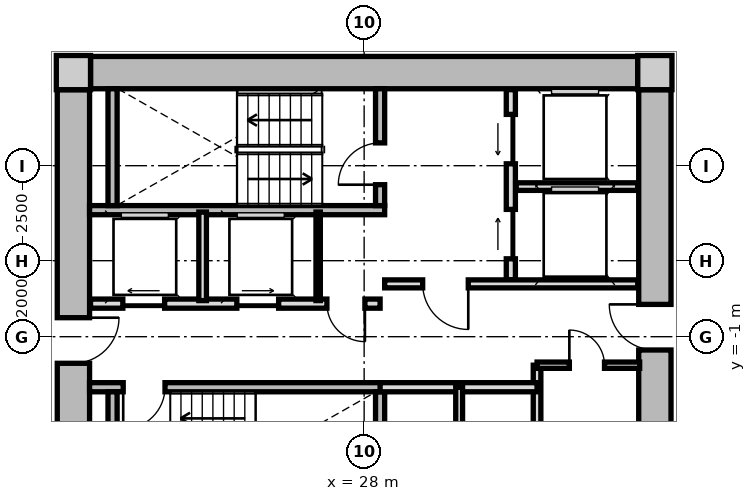
"""IFC4 building model, lengths in metres.
Left out: names, types, materials, properties, quantities, classifications, styles, units other than length and angle.
Written with IfcOpenShell. Run it as: python <this file> out.ifc"""

import sys

from ifc_helpers import new_model, si_unit, direction, frame, frame_2d, origin, origin_2d, place, context, subcontext, project, spatial, rectangle, extrude, source, transform, mapped, element, fill, save


model = new_model("IFC4")
c1 = context("Model", 3, precision=1e-05, world=origin(), true_north=direction((0.0, 1.0)))
c2 = subcontext(c1, "Body", "Model", "MODEL_VIEW")
j1 = project(units=[si_unit("LENGTHUNIT", "METRE"), si_unit("PLANEANGLEUNIT", "RADIAN")], contexts=[c1])
p1 = place(None, origin())
s1 = spatial("IfcSite", under=j1, at=p1, CompositionType="ELEMENT")
p2 = place(p1, origin())
s2 = spatial("IfcBuilding", under=s1, at=p2, CompositionType="ELEMENT")
p3 = place(p2, frame((0.0, 0.0, 46.0)))
s3 = spatial("IfcBuildingStorey", under=s2, at=p3, CompositionType="ELEMENT", Elevation=46.0)
m1 = source(origin(), c2, "Body", "SweptSolid", [
    extrude(rectangle(XDim=0.9, YDim=0.9, at=origin_2d()), origin(), (0.0, 0.0, 1.0), 3.05),
])
for number, where, z_axis, x_axis in (
    (1, (35.65, 5.95, 0.0), (0.0, 0.0, 1.0), (1.0, 0.0, 0.0)),
    (2, (20.35, 5.95, 0.0), (0.0, 0.0, 1.0), (1.0, 0.0, 0.0)),
):
    element("IfcColumn", number, at=place(p3, frame(where, z_axis=z_axis, x_axis=x_axis)), inside=s3, PredefinedType="COLUMN", context=c2, shape_type="MappedRepresentation", body=[
        mapped(m1, transform((0.0, 0.0, 0.0), x_axis=(1.0, 0.0, 0.0), y_axis=(0.0, 1.0, 0.0), z_axis=(0.0, 0.0, 1.0), scale=1.0)),
    ])
m2 = source(origin(), c2, "Body", "SweptSolid", [
    extrude(rectangle(XDim=14.4, YDim=0.85, at=frame_2d((7.2, 0.0))), origin(), (0.0, 0.0, 1.0), 2.79),
])
p4 = place(p3, frame((20.8, 5.95, 0.0), z_axis=(0.0, 0.0, 1.0), x_axis=(1.0, 0.0, 0.0)))
e3 = element("IfcWall", 3, at=p4, inside=s3, PredefinedType="SHEAR", context=c2, shape_type="MappedRepresentation", body=[
    mapped(m2, transform((0.0, 0.0, 0.0), x_axis=(1.0, 0.0, 0.0), y_axis=(0.0, 1.0, 0.0), z_axis=(0.0, 0.0, 1.0), scale=1.0)),
])
m3 = source(origin(), c2, "Body", "SweptSolid", [
    extrude(rectangle(XDim=11.0, YDim=0.85, at=frame_2d((5.5, 0.0))), origin(), (0.0, 0.0, 1.0), 2.79),
])
p5 = place(p3, frame((20.35, -5.5, 0.0), z_axis=(0.0, 0.0, 1.0), x_axis=(0.0, 1.0, 0.0)))
e4 = element("IfcWall", 4, at=p5, inside=s3, PredefinedType="SHEAR", context=c2, shape_type="MappedRepresentation", body=[
    mapped(m3, transform((0.0, 0.0, 0.0), x_axis=(1.0, 0.0, 0.0), y_axis=(0.0, 1.0, 0.0), z_axis=(0.0, 0.0, 1.0), scale=1.0)),
])
p6 = place(p5, frame((3.8, 0.0, 0.0)))
e5 = element("IfcOpeningElement", 5, at=p6, cuts=e4, PredefinedType="OPENING", context=c2, shape_type="SweptSolid", body=[
    extrude(rectangle(XDim=1.2, YDim=2.15, at=frame_2d((0.6, 1.075))), frame((0.0, 0.435, 0.0), z_axis=(0.0, -1.0, 0.0), x_axis=(1.0, 0.0, 0.0)), (0.0, 0.0, 1.0), 0.87),
])
p7 = place(p3, frame((35.65, 5.5, 0.0), z_axis=(0.0, 0.0, 1.0), x_axis=(0.0, -1.0, 0.0)))
e6 = element("IfcWall", 6, at=p7, inside=s3, PredefinedType="SHEAR", context=c2, shape_type="MappedRepresentation", body=[
    mapped(m3, transform((0.0, 0.0, 0.0), x_axis=(1.0, 0.0, 0.0), y_axis=(0.0, 1.0, 0.0), z_axis=(0.0, 0.0, 1.0), scale=1.0)),
])
p8 = place(p7, frame((5.65, 0.0, 0.0)))
e7 = element("IfcOpeningElement", 7, at=p8, cuts=e6, PredefinedType="OPENING", context=c2, shape_type="SweptSolid", body=[
    extrude(rectangle(XDim=1.2, YDim=2.15, at=frame_2d((0.6, 1.075))), frame((0.0, 0.435, 0.0), z_axis=(0.0, -1.0, 0.0), x_axis=(1.0, 0.0, 0.0)), (0.0, 0.0, 1.0), 0.87),
])
m4 = source(origin(), c2, "Body", "SweptSolid", [
    extrude(rectangle(XDim=7.765, YDim=0.24, at=frame_2d((3.883, 0.0))), origin(), (0.0, 0.0, 1.0), 2.79),
])
p9 = place(p3, frame((20.775, 2.33, 0.0), z_axis=(0.0, 0.0, 1.0), x_axis=(1.0, 0.0, 0.0)))
e8 = element("IfcWall", 8, at=p9, inside=s3, PredefinedType="PARTITIONING", context=c2, shape_type="MappedRepresentation", body=[
    mapped(m4, transform((0.0, 0.0, 0.0), x_axis=(1.0, 0.0, 0.0), y_axis=(0.0, 1.0, 0.0), z_axis=(0.0, 0.0, 1.0), scale=1.0)),
])
m5 = source(origin(), c2, "Body", "SweptSolid", [
    extrude(rectangle(XDim=3.075, YDim=0.24, at=frame_2d((1.538, 0.0))), origin(), (0.0, 0.0, 1.0), 2.79),
])
p10 = place(p3, frame((21.38, 2.45, 0.0), z_axis=(0.0, 0.0, 1.0), x_axis=(0.0, 1.0, 0.0)))
e9 = element("IfcWall", 9, at=p10, inside=s3, PredefinedType="PARTITIONING", context=c2, shape_type="MappedRepresentation", body=[
    mapped(m5, transform((0.0, 0.0, 0.0), x_axis=(1.0, 0.0, 0.0), y_axis=(0.0, 1.0, 0.0), z_axis=(0.0, 0.0, 1.0), scale=1.0)),
])
p11 = place(p3, frame((28.42, 2.45, 0.0), z_axis=(0.0, 0.0, 1.0), x_axis=(0.0, 1.0, 0.0)))
e10 = element("IfcWall", 10, at=p11, inside=s3, PredefinedType="PARTITIONING", context=c2, shape_type="MappedRepresentation", body=[
    mapped(m5, transform((0.0, 0.0, 0.0), x_axis=(1.0, 0.0, 0.0), y_axis=(0.0, 1.0, 0.0), z_axis=(0.0, 0.0, 1.0), scale=1.0)),
])
p12 = place(p11, frame((0.55, 0.0, 0.0)))
e11 = element("IfcOpeningElement", 11, at=p12, cuts=e10, PredefinedType="OPENING", context=c2, shape_type="SweptSolid", body=[
    extrude(rectangle(XDim=1.1, YDim=2.15, at=frame_2d((0.55, 1.075))), frame((0.0, 0.13, 0.0), z_axis=(0.0, -1.0, 0.0), x_axis=(1.0, 0.0, 0.0)), (0.0, 0.0, 1.0), 0.26),
])
p13 = place(p3, frame((20.775, -2.33, 0.0), z_axis=(0.0, 0.0, 1.0), x_axis=(1.0, 0.0, 0.0)))
e12 = element("IfcWall", 12, at=p13, inside=s3, PredefinedType="PARTITIONING", context=c2, shape_type="MappedRepresentation", body=[
    mapped(m4, transform((0.0, 0.0, 0.0), x_axis=(1.0, 0.0, 0.0), y_axis=(0.0, 1.0, 0.0), z_axis=(0.0, 0.0, 1.0), scale=1.0)),
])
p14 = place(p13, frame((0.885, 0.0, 0.0)))
e13 = element("IfcOpeningElement", 13, at=p14, cuts=e12, PredefinedType="OPENING", context=c2, shape_type="SweptSolid", body=[
    extrude(rectangle(XDim=1.1, YDim=2.15, at=frame_2d((0.55, 1.075))), frame((0.0, 0.13, 0.0), z_axis=(0.0, -1.0, 0.0), x_axis=(1.0, 0.0, 0.0)), (0.0, 0.0, 1.0), 0.26),
])
for number, where, z_axis, x_axis in (
    (14, (21.38, -5.525, 0.0), (0.0, 0.0, 1.0), (0.0, 1.0, 0.0)),
    (15, (28.42, -5.525, 0.0), (0.0, 0.0, 1.0), (0.0, 1.0, 0.0)),
):
    element("IfcWall", number, at=place(p3, frame(where, z_axis=z_axis, x_axis=x_axis)), inside=s3, PredefinedType="PARTITIONING", context=c2, shape_type="MappedRepresentation", body=[
        mapped(m5, transform((0.0, 0.0, 0.0), x_axis=(1.0, 0.0, 0.0), y_axis=(0.0, 1.0, 0.0), z_axis=(0.0, 0.0, 1.0), scale=1.0)),
    ])
m6 = source(origin(), c2, "Body", "SweptSolid", [
    extrude(rectangle(XDim=5.0, YDim=0.24, at=frame_2d((2.5, 0.0))), origin(), (0.0, 0.0, 1.0), 2.775),
])
p15 = place(p3, frame((31.86, 0.5, 0.0), z_axis=(0.0, 0.0, 1.0), x_axis=(0.0, 1.0, 0.0)))
e16 = element("IfcWall", 16, at=p15, inside=s3, PredefinedType="PARTITIONING", context=c2, shape_type="MappedRepresentation", body=[
    mapped(m6, transform((0.0, 0.0, 0.0), x_axis=(1.0, 0.0, 0.0), y_axis=(0.0, 1.0, 0.0), z_axis=(0.0, 0.0, 1.0), scale=1.0)),
])
p16 = place(p15, frame((3.05, 0.0, 0.0)))
e17 = element("IfcOpeningElement", 17, at=p16, cuts=e16, PredefinedType="OPENING", context=c2, shape_type="SweptSolid", body=[
    extrude(rectangle(XDim=1.3, YDim=2.2, at=frame_2d((0.65, 1.1))), frame((0.0, 0.13, 0.0), z_axis=(0.0, -1.0, 0.0), x_axis=(1.0, 0.0, 0.0)), (0.0, 0.0, 1.0), 0.26),
])
p17 = place(p15, frame((0.55, 0.0, 0.0)))
e18 = element("IfcOpeningElement", 18, at=p17, cuts=e16, PredefinedType="OPENING", context=c2, shape_type="SweptSolid", body=[
    extrude(rectangle(XDim=1.3, YDim=2.2, at=frame_2d((0.65, 1.1))), frame((0.0, 0.13, 0.0), z_axis=(0.0, -1.0, 0.0), x_axis=(1.0, 0.0, 0.0)), (0.0, 0.0, 1.0), 0.26),
])
m7 = source(origin(), c2, "Body", "SweptSolid", [
    extrude(rectangle(XDim=3.2, YDim=0.2, at=frame_2d((1.6, 0.0))), origin(), (0.0, 0.0, 1.0), 2.775),
])
p18 = place(p3, frame((32.0, 2.95, 0.0), z_axis=(0.0, 0.0, 1.0), x_axis=(1.0, 0.0, 0.0)))
e19 = element("IfcWall", 19, at=p18, inside=s3, PredefinedType="PARTITIONING", context=c2, shape_type="MappedRepresentation", body=[
    mapped(m7, transform((0.0, 0.0, 0.0), x_axis=(1.0, 0.0, 0.0), y_axis=(0.0, 1.0, 0.0), z_axis=(0.0, 0.0, 1.0), scale=1.0)),
])
m8 = source(origin(), c2, "Body", "SweptSolid", [
    extrude(rectangle(XDim=6.66, YDim=0.21, at=frame_2d((3.33, 0.0))), origin(), (0.0, 0.0, 1.0), 2.775),
])
p19 = place(p3, frame((28.54, 0.39, 0.0), z_axis=(0.0, 0.0, 1.0), x_axis=(1.0, 0.0, 0.0)))
e20 = element("IfcWall", 20, at=p19, inside=s3, PredefinedType="PARTITIONING", context=c2, shape_type="MappedRepresentation", body=[
    mapped(m8, transform((0.0, 0.0, 0.0), x_axis=(1.0, 0.0, 0.0), y_axis=(0.0, 1.0, 0.0), z_axis=(0.0, 0.0, 1.0), scale=1.0)),
])
p20 = place(p19, frame((1.0, 0.0, 0.0)))
e21 = element("IfcOpeningElement", 21, at=p20, cuts=e20, PredefinedType="OPENING", context=c2, shape_type="SweptSolid", body=[
    extrude(rectangle(XDim=1.2, YDim=2.15, at=frame_2d((0.6, 1.075))), frame((0.0, 0.115, 0.0), z_axis=(0.0, -1.0, 0.0), x_axis=(1.0, 0.0, 0.0)), (0.0, 0.0, 1.0), 0.23),
])
m9 = source(origin(), c2, "Body", "SweptSolid", [
    extrude(rectangle(XDim=7.62, YDim=0.24, at=frame_2d((3.81, 0.0))), origin(), (0.0, 0.0, 1.0), 2.775),
])
p21 = place(p3, frame((20.8, -0.13, 0.0), z_axis=(0.0, 0.0, 1.0), x_axis=(1.0, 0.0, 0.0)))
e22 = element("IfcWall", 22, at=p21, inside=s3, PredefinedType="PARTITIONING", context=c2, shape_type="MappedRepresentation", body=[
    mapped(m9, transform((0.0, 0.0, 0.0), x_axis=(1.0, 0.0, 0.0), y_axis=(0.0, 1.0, 0.0), z_axis=(0.0, 0.0, 1.0), scale=1.0)),
])
p22 = place(p21, frame((6.22, 0.0, 0.0)))
e23 = element("IfcOpeningElement", 23, at=p22, cuts=e22, PredefinedType="OPENING", context=c2, shape_type="SweptSolid", body=[
    extrude(rectangle(XDim=1.0, YDim=2.1, at=frame_2d((0.5, 1.05))), frame((0.0, 0.13, 0.0), z_axis=(0.0, -1.0, 0.0), x_axis=(1.0, 0.0, 0.0)), (0.0, 0.0, 1.0), 0.26),
])
p23 = place(p21, frame((0.85, 0.0, 0.0)))
e24 = element("IfcOpeningElement", 24, at=p23, cuts=e22, PredefinedType="OPENING", context=c2, shape_type="SweptSolid", body=[
    extrude(rectangle(XDim=1.1, YDim=2.2, at=frame_2d((0.55, 1.1))), frame((0.0, 0.13, 0.0), z_axis=(0.0, -1.0, 0.0), x_axis=(1.0, 0.0, 0.0)), (0.0, 0.0, 1.0), 0.26),
])
p24 = place(p21, frame((3.85, 0.0, 0.0)))
e25 = element("IfcOpeningElement", 25, at=p24, cuts=e22, PredefinedType="OPENING", context=c2, shape_type="SweptSolid", body=[
    extrude(rectangle(XDim=1.1, YDim=2.2, at=frame_2d((0.55, 1.1))), frame((0.0, 0.13, 0.0), z_axis=(0.0, -1.0, 0.0), x_axis=(1.0, 0.0, 0.0)), (0.0, 0.0, 1.0), 0.26),
])
m10 = source(origin(), c2, "Body", "SweptSolid", [
    extrude(rectangle(XDim=2.33, YDim=0.115, at=frame_2d((1.165, 0.0))), origin(), (0.0, 0.0, 1.0), 2.775),
])
p25 = place(p3, frame((26.79, -0.05, 0.0), z_axis=(0.0, 0.0, 1.0), x_axis=(0.0, 1.0, 0.0)))
e26 = element("IfcWall", 26, at=p25, inside=s3, PredefinedType="PARTITIONING", context=c2, shape_type="MappedRepresentation", body=[
    mapped(m10, transform((0.0, 0.0, 0.0), x_axis=(1.0, 0.0, 0.0), y_axis=(0.0, 1.0, 0.0), z_axis=(0.0, 0.0, 1.0), scale=1.0)),
])
m11 = source(origin(), c2, "Body", "SweptSolid", [
    extrude(rectangle(XDim=2.33, YDim=0.2, at=frame_2d((1.165, 0.0))), origin(), (0.0, 0.0, 1.0), 2.775),
])
p26 = place(p3, frame((23.75, -0.05, 0.0), z_axis=(0.0, 0.0, 1.0), x_axis=(0.0, 1.0, 0.0)))
e27 = element("IfcWall", 27, at=p26, inside=s3, PredefinedType="PARTITIONING", context=c2, shape_type="MappedRepresentation", body=[
    mapped(m11, transform((0.0, 0.0, 0.0), x_axis=(1.0, 0.0, 0.0), y_axis=(0.0, 1.0, 0.0), z_axis=(0.0, 0.0, 1.0), scale=1.0)),
])
m12 = source(origin(), c2, "Body", "SweptSolid", [
    extrude(rectangle(XDim=3.8, YDim=0.2, at=frame_2d((1.9, 0.0))), origin(), (0.0, 0.0, 1.0), 2.775),
])
p27 = place(p3, frame((32.55, -5.55, 0.0), z_axis=(0.0, 0.0, 1.0), x_axis=(0.0, 1.0, 0.0)))
e28 = element("IfcWall", 28, at=p27, inside=s3, PredefinedType="PARTITIONING", context=c2, shape_type="MappedRepresentation", body=[
    mapped(m12, transform((0.0, 0.0, 0.0), x_axis=(1.0, 0.0, 0.0), y_axis=(0.0, 1.0, 0.0), z_axis=(0.0, 0.0, 1.0), scale=1.0)),
])
m13 = source(origin(), c2, "Body", "SweptSolid", [
    extrude(rectangle(XDim=4.13, YDim=0.24, at=frame_2d((2.065, 0.0))), origin(), (0.0, 0.0, 1.0), 2.775),
])
p28 = place(p3, frame((28.42, -2.33, 0.0), z_axis=(0.0, 0.0, 1.0), x_axis=(1.0, 0.0, 0.0)))
e29 = element("IfcWall", 29, at=p28, inside=s3, PredefinedType="PARTITIONING", context=c2, shape_type="MappedRepresentation", body=[
    mapped(m13, transform((0.0, 0.0, 0.0), x_axis=(1.0, 0.0, 0.0), y_axis=(0.0, 1.0, 0.0), z_axis=(0.0, 0.0, 1.0), scale=1.0)),
])
m14 = source(origin(), c2, "Body", "SweptSolid", [
    extrude(rectangle(XDim=3.22, YDim=0.18, at=frame_2d((1.61, 0.0))), origin(), (0.0, 0.0, 1.0), 2.775),
])
p29 = place(p3, frame((30.5, -5.55, 0.0), z_axis=(0.0, 0.0, 1.0), x_axis=(0.0, 1.0, 0.0)))
e30 = element("IfcWall", 30, at=p29, inside=s3, PredefinedType="PARTITIONING", context=c2, shape_type="MappedRepresentation", body=[
    mapped(m14, transform((0.0, 0.0, 0.0), x_axis=(1.0, 0.0, 0.0), y_axis=(0.0, 1.0, 0.0), z_axis=(0.0, 0.0, 1.0), scale=1.0)),
])
m15 = source(origin(), c2, "Body", "SweptSolid", [
    extrude(rectangle(XDim=2.7, YDim=0.165, at=frame_2d((1.35, 0.0))), origin(), (0.0, 0.0, 1.0), 2.775),
])
p30 = place(p3, frame((32.55, -1.75, 0.0), z_axis=(0.0, 0.0, 1.0), x_axis=(1.0, 0.0, 0.0)))
e31 = element("IfcWall", 31, at=p30, inside=s3, PredefinedType="PARTITIONING", context=c2, shape_type="MappedRepresentation", body=[
    mapped(m15, transform((0.0, 0.0, 0.0), x_axis=(1.0, 0.0, 0.0), y_axis=(0.0, 1.0, 0.0), z_axis=(0.0, 0.0, 1.0), scale=1.0)),
])
p31 = place(p30, frame((0.85, 0.0, 0.0)))
e32 = element("IfcOpeningElement", 32, at=p31, cuts=e31, PredefinedType="OPENING", context=c2, shape_type="SweptSolid", body=[
    extrude(rectangle(XDim=0.925, YDim=2.1, at=frame_2d((0.462, 1.05))), frame((0.0, 0.093, 0.0), z_axis=(0.0, -1.0, 0.0), x_axis=(1.0, 0.0, 0.0)), (0.0, 0.0, 1.0), 0.185),
])
m16 = source(origin(), c2, "Body", "SweptSolid", [
    extrude(rectangle(XDim=1.1, YDim=2.15, at=frame_2d((0.55, 1.075))), frame((0.0, 0.025, 0.0), z_axis=(0.0, -1.0, 0.0), x_axis=(1.0, 0.0, 0.0)), (0.0, 0.0, 1.0), 0.05),
])
p32 = place(p12, origin())
e33 = element("IfcDoor", 33, at=p32, inside=s3, OperationType="SINGLE_SWING_LEFT", PredefinedType="DOOR", context=c2, shape_type="MappedRepresentation", body=[
    mapped(m16, transform((0.0, 0.0, 0.0), x_axis=(1.0, 0.0, 0.0), y_axis=(0.0, 1.0, 0.0), z_axis=(0.0, 0.0, 1.0), scale=1.0)),
])
fill(e11, e33)
p33 = place(p14, frame((1.1, 0.0, 0.0), z_axis=(0.0, 0.0, 1.0), x_axis=(-1.0, 0.0, 0.0)))
e34 = element("IfcDoor", 34, at=p33, inside=s3, OperationType="SINGLE_SWING_RIGHT", PredefinedType="DOOR", context=c2, shape_type="MappedRepresentation", body=[
    mapped(m16, transform((0.0, 0.0, 0.0), x_axis=(1.0, 0.0, 0.0), y_axis=(0.0, 1.0, 0.0), z_axis=(0.0, 0.0, 1.0), scale=1.0)),
])
fill(e13, e34)
m17 = source(origin(), c2, "Body", "SweptSolid", [
    extrude(rectangle(XDim=1.3, YDim=2.2, at=frame_2d((0.65, 1.1))), frame((0.0, 0.025, 0.0), z_axis=(0.0, -1.0, 0.0), x_axis=(1.0, 0.0, 0.0)), (0.0, 0.0, 1.0), 0.05),
])
p34 = place(p16, origin())
e35 = element("IfcDoor", 35, at=p34, inside=s3, OperationType="SLIDING_TO_LEFT", PredefinedType="DOOR", context=c2, shape_type="MappedRepresentation", body=[
    mapped(m17, transform((0.0, 0.0, 0.0), x_axis=(1.0, 0.0, 0.0), y_axis=(0.0, 1.0, 0.0), z_axis=(0.0, 0.0, 1.0), scale=1.0)),
])
fill(e17, e35)
p35 = place(p17, origin())
e36 = element("IfcDoor", 36, at=p35, inside=s3, OperationType="SLIDING_TO_RIGHT", PredefinedType="DOOR", context=c2, shape_type="MappedRepresentation", body=[
    mapped(m17, transform((0.0, 0.0, 0.0), x_axis=(1.0, 0.0, 0.0), y_axis=(0.0, 1.0, 0.0), z_axis=(0.0, 0.0, 1.0), scale=1.0)),
])
fill(e18, e36)
m18 = source(origin(), c2, "Body", "SweptSolid", [
    extrude(rectangle(XDim=1.2, YDim=2.15, at=frame_2d((0.6, 1.075))), frame((0.0, 0.025, 0.0), z_axis=(0.0, -1.0, 0.0), x_axis=(1.0, 0.0, 0.0)), (0.0, 0.0, 1.0), 0.05),
])
p36 = place(p20, frame((1.2, 0.0, 0.0), z_axis=(0.0, 0.0, 1.0), x_axis=(-1.0, 0.0, 0.0)))
e37 = element("IfcDoor", 37, at=p36, inside=s3, OperationType="SINGLE_SWING_LEFT", PredefinedType="DOOR", context=c2, shape_type="MappedRepresentation", body=[
    mapped(m18, transform((0.0, 0.0, 0.0), x_axis=(1.0, 0.0, 0.0), y_axis=(0.0, 1.0, 0.0), z_axis=(0.0, 0.0, 1.0), scale=1.0)),
])
fill(e21, e37)
p37 = place(p6, frame((1.2, 0.0, 0.0), z_axis=(0.0, 0.0, 1.0), x_axis=(-1.0, 0.0, 0.0)))
e38 = element("IfcDoor", 38, at=p37, inside=s3, OperationType="SINGLE_SWING_LEFT", PredefinedType="DOOR", context=c2, shape_type="MappedRepresentation", body=[
    mapped(m18, transform((0.0, 0.0, 0.0), x_axis=(1.0, 0.0, 0.0), y_axis=(0.0, 1.0, 0.0), z_axis=(0.0, 0.0, 1.0), scale=1.0)),
])
fill(e5, e38)
p38 = place(p8, frame((1.2, 0.0, 0.0), z_axis=(0.0, 0.0, 1.0), x_axis=(-1.0, 0.0, 0.0)))
e39 = element("IfcDoor", 39, at=p38, inside=s3, OperationType="SINGLE_SWING_RIGHT", PredefinedType="DOOR", context=c2, shape_type="MappedRepresentation", body=[
    mapped(m18, transform((0.0, 0.0, 0.0), x_axis=(1.0, 0.0, 0.0), y_axis=(0.0, 1.0, 0.0), z_axis=(0.0, 0.0, 1.0), scale=1.0)),
])
fill(e7, e39)
m19 = source(origin(), c2, "Body", "SweptSolid", [
    extrude(rectangle(XDim=1.0, YDim=2.1, at=frame_2d((0.5, 1.05))), frame((0.0, 0.025, 0.0), z_axis=(0.0, -1.0, 0.0), x_axis=(1.0, 0.0, 0.0)), (0.0, 0.0, 1.0), 0.05),
])
p39 = place(p22, frame((1.0, 0.0, 0.0), z_axis=(0.0, 0.0, 1.0), x_axis=(-1.0, 0.0, 0.0)))
e40 = element("IfcDoor", 40, at=p39, inside=s3, OperationType="SINGLE_SWING_LEFT", PredefinedType="DOOR", context=c2, shape_type="MappedRepresentation", body=[
    mapped(m19, transform((0.0, 0.0, 0.0), x_axis=(1.0, 0.0, 0.0), y_axis=(0.0, 1.0, 0.0), z_axis=(0.0, 0.0, 1.0), scale=1.0)),
])
fill(e23, e40)
m20 = source(origin(), c2, "Body", "SweptSolid", [
    extrude(rectangle(XDim=1.1, YDim=2.2, at=frame_2d((0.55, 1.1))), frame((0.0, 0.025, 0.0), z_axis=(0.0, -1.0, 0.0), x_axis=(1.0, 0.0, 0.0)), (0.0, 0.0, 1.0), 0.05),
])
p40 = place(p23, origin())
e41 = element("IfcDoor", 41, at=p40, inside=s3, OperationType="SLIDING_TO_LEFT", PredefinedType="DOOR", context=c2, shape_type="MappedRepresentation", body=[
    mapped(m20, transform((0.0, 0.0, 0.0), x_axis=(1.0, 0.0, 0.0), y_axis=(0.0, 1.0, 0.0), z_axis=(0.0, 0.0, 1.0), scale=1.0)),
])
fill(e24, e41)
p41 = place(p24, origin())
e42 = element("IfcDoor", 42, at=p41, inside=s3, OperationType="SLIDING_TO_RIGHT", PredefinedType="DOOR", context=c2, shape_type="MappedRepresentation", body=[
    mapped(m20, transform((0.0, 0.0, 0.0), x_axis=(1.0, 0.0, 0.0), y_axis=(0.0, 1.0, 0.0), z_axis=(0.0, 0.0, 1.0), scale=1.0)),
])
fill(e25, e42)
m21 = source(origin(), c2, "Body", "SweptSolid", [
    extrude(rectangle(XDim=0.925, YDim=2.1, at=frame_2d((0.462, 1.05))), frame((0.0, 0.025, 0.0), z_axis=(0.0, -1.0, 0.0), x_axis=(1.0, 0.0, 0.0)), (0.0, 0.0, 1.0), 0.05),
])
p42 = place(p31, origin())
e43 = element("IfcDoor", 43, at=p42, inside=s3, OperationType="SINGLE_SWING_LEFT", PredefinedType="DOOR", context=c2, shape_type="MappedRepresentation", body=[
    mapped(m21, transform((0.0, 0.0, 0.0), x_axis=(1.0, 0.0, 0.0), y_axis=(0.0, 1.0, 0.0), z_axis=(0.0, 0.0, 1.0), scale=1.0)),
])
fill(e32, e43)
save(model, sys.argv[1])
